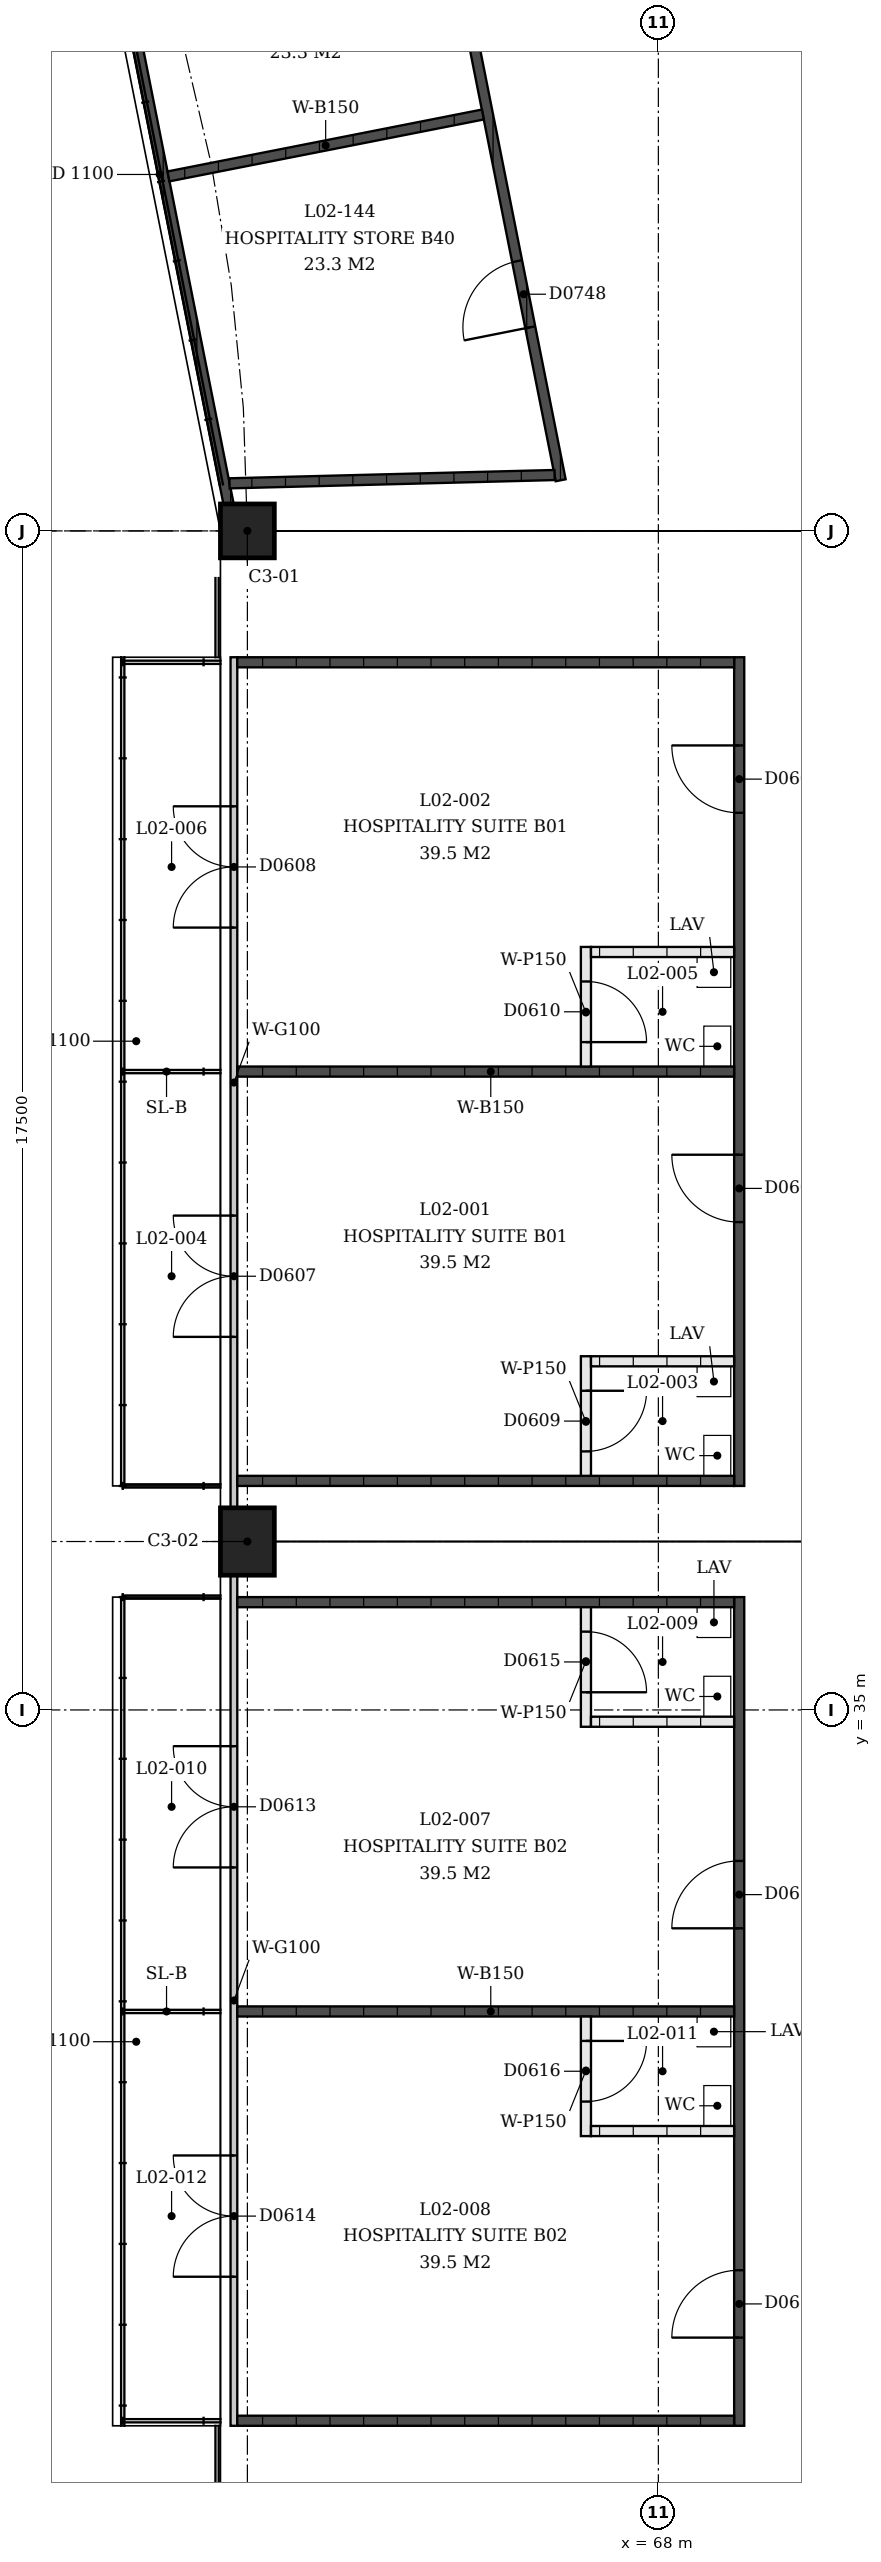
"""IFC4 building model, lengths in metres.
Left out: names, types, materials, properties, quantities, classifications, styles, units other than length and angle.
Written with IfcOpenShell. Run it as: python <this file> out.ifc"""

import sys

from ifc_helpers import new_model, si_unit, direction, frame, frame_2d, origin, origin_2d, place, context, subcontext, project, spatial, rectangle, extrude, element, fill, save


model = new_model("IFC4")
c1 = context("Model", 3, precision=1e-05, world=origin(), true_north=direction((0.0, 1.0)))
c2 = subcontext(c1, "Body", "Model", "MODEL_VIEW")
j1 = project(units=[si_unit("LENGTHUNIT", "METRE"), si_unit("PLANEANGLEUNIT", "RADIAN")], contexts=[c1])
p1 = place(None, origin())
s1 = spatial("IfcSite", under=j1, at=p1, CompositionType="ELEMENT")
p2 = place(p1, origin())
s2 = spatial("IfcBuilding", under=s1, at=p2, CompositionType="ELEMENT")
p3 = place(p2, frame((0.0, 0.0, 9.0)))
s3 = spatial("IfcBuildingStorey", under=s2, at=p3, CompositionType="ELEMENT", Elevation=9.0)
p4 = place(p3, frame((61.9, 52.5, 0.0), z_axis=(0.0, 0.0, 1.0), x_axis=(0.0, 1.0, 0.0)))
e1 = element("IfcColumn", 1, at=p4, inside=s3, PredefinedType="COLUMN", context=c2, shape_type="SweptSolid", body=[
    extrude(rectangle(XDim=0.8, YDim=0.8, at=origin_2d()), origin(), (0.0, 0.0, 1.0), 4.5),
])
p5 = place(p3, frame((61.9, 37.5, 0.0), z_axis=(0.0, 0.0, 1.0), x_axis=(0.0, 1.0, 0.0)))
e2 = element("IfcColumn", 2, at=p5, inside=s3, PredefinedType="COLUMN", context=c2, shape_type="SweptSolid", body=[
    extrude(rectangle(XDim=1.0, YDim=0.8, at=origin_2d()), origin(), (0.0, 0.0, 1.0), 4.5),
])
p6 = place(p3, frame((61.7, 38.0, 0.0), z_axis=(0.0, 0.0, 1.0), x_axis=(0.0, 1.0, 0.0)))
e3 = element("IfcWall", 3, at=p6, inside=s3, PredefinedType="PARTITIONING", context=c2, shape_type="SweptSolid", body=[
    extrude(rectangle(XDim=12.625, YDim=0.1, at=frame_2d((6.312, 0.0))), origin(), (0.0, 0.0, 1.0), 3.0),
])
p7 = place(p6, frame((2.538, 0.0, 0.0)))
e4 = element("IfcOpeningElement", 4, at=p7, cuts=e3, PredefinedType="OPENING", context=c2, shape_type="SweptSolid", body=[
    extrude(rectangle(XDim=1.8, YDim=2.1, at=frame_2d((0.9, 1.05))), frame((0.0, 0.05, 0.0), z_axis=(0.0, -1.0, 0.0), x_axis=(1.0, 0.0, 0.0)), (0.0, 0.0, 1.0), 0.1),
])
p8 = place(p6, frame((8.613, 0.0, 0.0)))
e5 = element("IfcOpeningElement", 5, at=p8, cuts=e3, PredefinedType="OPENING", context=c2, shape_type="SweptSolid", body=[
    extrude(rectangle(XDim=1.8, YDim=2.1, at=frame_2d((0.9, 1.05))), frame((0.0, 0.05, 0.0), z_axis=(0.0, -1.0, 0.0), x_axis=(1.0, 0.0, 0.0)), (0.0, 0.0, 1.0), 0.1),
])
p9 = place(p3, frame((69.2, 38.325, 0.0), z_axis=(0.0, 0.0, 1.0), x_axis=(0.0, 1.0, 0.0)))
e6 = element("IfcWall", 6, at=p9, inside=s3, PredefinedType="SOLIDWALL", context=c2, shape_type="SweptSolid", body=[
    extrude(rectangle(XDim=12.3, YDim=0.15, at=frame_2d((6.15, 0.0))), origin(), (0.0, 0.0, 1.0), 3.0),
])
p10 = place(p9, frame((3.916, 0.0, 0.0)))
e7 = element("IfcOpeningElement", 7, at=p10, cuts=e6, PredefinedType="OPENING", context=c2, shape_type="SweptSolid", body=[
    extrude(rectangle(XDim=1.0, YDim=2.1, at=frame_2d((0.5, 1.05))), frame((0.0, 0.075, 0.0), z_axis=(0.0, -1.0, 0.0), x_axis=(1.0, 0.0, 0.0)), (0.0, 0.0, 1.0), 0.15),
])
p11 = place(p9, frame((9.991, 0.0, 0.0)))
e8 = element("IfcOpeningElement", 8, at=p11, cuts=e6, PredefinedType="OPENING", context=c2, shape_type="SweptSolid", body=[
    extrude(rectangle(XDim=1.0, YDim=2.1, at=frame_2d((0.5, 1.05))), frame((0.0, 0.075, 0.0), z_axis=(0.0, -1.0, 0.0), x_axis=(1.0, 0.0, 0.0)), (0.0, 0.0, 1.0), 0.15),
])
for number, where, z_axis, x_axis in (
    (9, (61.75, 38.4, 0.0), (0.0, 0.0, 1.0), (1.0, 0.0, 0.0)),
    (10, (61.75, 44.475, 0.0), (0.0, 0.0, 1.0), (1.0, 0.0, 0.0)),
    (11, (61.75, 50.55, 0.0), (0.0, 0.0, 1.0), (1.0, 0.0, 0.0)),
):
    element("IfcWall", number, at=place(p3, frame(where, z_axis=z_axis, x_axis=x_axis)), inside=s3, PredefinedType="SOLIDWALL", context=c2, shape_type="SweptSolid", body=[
        extrude(rectangle(XDim=7.375, YDim=0.15, at=frame_2d((3.688, 0.0))), origin(), (0.0, 0.0, 1.0), 3.0),
    ])
p12 = place(p3, frame((66.925, 38.475, 0.0), z_axis=(0.0, 0.0, 1.0), x_axis=(0.0, 1.0, 0.0)))
e12 = element("IfcWall", 12, at=p12, inside=s3, PredefinedType="PARTITIONING", context=c2, shape_type="SweptSolid", body=[
    extrude(rectangle(XDim=1.775, YDim=0.15, at=frame_2d((0.887, 0.0))), origin(), (0.0, 0.0, 1.0), 3.0),
])
p13 = place(p12, frame((0.363, 0.0, 0.0)))
e13 = element("IfcOpeningElement", 13, at=p13, cuts=e12, PredefinedType="OPENING", context=c2, shape_type="SweptSolid", body=[
    extrude(rectangle(XDim=0.9, YDim=2.1, at=frame_2d((0.45, 1.05))), frame((0.0, 0.075, 0.0), z_axis=(0.0, -1.0, 0.0), x_axis=(1.0, 0.0, 0.0)), (0.0, 0.0, 1.0), 0.15),
])
p14 = place(p3, frame((67.0, 40.175, 0.0), z_axis=(0.0, 0.0, 1.0), x_axis=(1.0, 0.0, 0.0)))
e14 = element("IfcWall", 14, at=p14, inside=s3, PredefinedType="PARTITIONING", context=c2, shape_type="SweptSolid", body=[
    extrude(rectangle(XDim=2.125, YDim=0.15, at=frame_2d((1.062, 0.0))), origin(), (0.0, 0.0, 1.0), 3.0),
])
p15 = place(p3, frame((66.925, 44.55, 0.0), z_axis=(0.0, 0.0, 1.0), x_axis=(0.0, 1.0, 0.0)))
e15 = element("IfcWall", 15, at=p15, inside=s3, PredefinedType="PARTITIONING", context=c2, shape_type="SweptSolid", body=[
    extrude(rectangle(XDim=1.775, YDim=0.15, at=frame_2d((0.887, 0.0))), origin(), (0.0, 0.0, 1.0), 3.0),
])
p16 = place(p15, frame((0.363, 0.0, 0.0)))
e16 = element("IfcOpeningElement", 16, at=p16, cuts=e15, PredefinedType="OPENING", context=c2, shape_type="SweptSolid", body=[
    extrude(rectangle(XDim=0.9, YDim=2.1, at=frame_2d((0.45, 1.05))), frame((0.0, 0.075, 0.0), z_axis=(0.0, -1.0, 0.0), x_axis=(1.0, 0.0, 0.0)), (0.0, 0.0, 1.0), 0.15),
])
p17 = place(p3, frame((67.0, 46.25, 0.0), z_axis=(0.0, 0.0, 1.0), x_axis=(1.0, 0.0, 0.0)))
e17 = element("IfcWall", 17, at=p17, inside=s3, PredefinedType="PARTITIONING", context=c2, shape_type="SweptSolid", body=[
    extrude(rectangle(XDim=2.125, YDim=0.15, at=frame_2d((1.062, 0.0))), origin(), (0.0, 0.0, 1.0), 3.0),
])
p18 = place(p3, frame((61.7, 37.0, 0.0), z_axis=(0.0, 0.0, 1.0), x_axis=(0.0, -1.0, 0.0)))
e18 = element("IfcWall", 18, at=p18, inside=s3, PredefinedType="PARTITIONING", context=c2, shape_type="SweptSolid", body=[
    extrude(rectangle(XDim=12.625, YDim=0.1, at=frame_2d((6.312, 0.0))), origin(), (0.0, 0.0, 1.0), 3.0),
])
p19 = place(p18, frame((2.538, 0.0, 0.0)))
e19 = element("IfcOpeningElement", 19, at=p19, cuts=e18, PredefinedType="OPENING", context=c2, shape_type="SweptSolid", body=[
    extrude(rectangle(XDim=1.8, YDim=2.1, at=frame_2d((0.9, 1.05))), frame((0.0, 0.05, 0.0), z_axis=(0.0, -1.0, 0.0), x_axis=(1.0, 0.0, 0.0)), (0.0, 0.0, 1.0), 0.1),
])
p20 = place(p18, frame((8.613, 0.0, 0.0)))
e20 = element("IfcOpeningElement", 20, at=p20, cuts=e18, PredefinedType="OPENING", context=c2, shape_type="SweptSolid", body=[
    extrude(rectangle(XDim=1.8, YDim=2.1, at=frame_2d((0.9, 1.05))), frame((0.0, 0.05, 0.0), z_axis=(0.0, -1.0, 0.0), x_axis=(1.0, 0.0, 0.0)), (0.0, 0.0, 1.0), 0.1),
])
p21 = place(p3, frame((69.2, 36.675, 0.0), z_axis=(0.0, 0.0, 1.0), x_axis=(0.0, -1.0, 0.0)))
e21 = element("IfcWall", 21, at=p21, inside=s3, PredefinedType="SOLIDWALL", context=c2, shape_type="SweptSolid", body=[
    extrude(rectangle(XDim=12.3, YDim=0.15, at=frame_2d((6.15, 0.0))), origin(), (0.0, 0.0, 1.0), 3.0),
])
p22 = place(p21, frame((3.916, 0.0, 0.0)))
e22 = element("IfcOpeningElement", 22, at=p22, cuts=e21, PredefinedType="OPENING", context=c2, shape_type="SweptSolid", body=[
    extrude(rectangle(XDim=1.0, YDim=2.1, at=frame_2d((0.5, 1.05))), frame((0.0, 0.075, 0.0), z_axis=(0.0, -1.0, 0.0), x_axis=(1.0, 0.0, 0.0)), (0.0, 0.0, 1.0), 0.15),
])
p23 = place(p21, frame((9.991, 0.0, 0.0)))
e23 = element("IfcOpeningElement", 23, at=p23, cuts=e21, PredefinedType="OPENING", context=c2, shape_type="SweptSolid", body=[
    extrude(rectangle(XDim=1.0, YDim=2.1, at=frame_2d((0.5, 1.05))), frame((0.0, 0.075, 0.0), z_axis=(0.0, -1.0, 0.0), x_axis=(1.0, 0.0, 0.0)), (0.0, 0.0, 1.0), 0.15),
])
for number, where, z_axis, x_axis in (
    (24, (61.75, 36.6, 0.0), (0.0, 0.0, 1.0), (1.0, 0.0, 0.0)),
    (25, (61.75, 30.525, 0.0), (0.0, 0.0, 1.0), (1.0, 0.0, 0.0)),
    (26, (61.75, 24.45, 0.0), (0.0, 0.0, 1.0), (1.0, 0.0, 0.0)),
):
    element("IfcWall", number, at=place(p3, frame(where, z_axis=z_axis, x_axis=x_axis)), inside=s3, PredefinedType="SOLIDWALL", context=c2, shape_type="SweptSolid", body=[
        extrude(rectangle(XDim=7.375, YDim=0.15, at=frame_2d((3.688, 0.0))), origin(), (0.0, 0.0, 1.0), 3.0),
    ])
p24 = place(p3, frame((66.925, 36.525, 0.0), z_axis=(0.0, 0.0, 1.0), x_axis=(0.0, -1.0, 0.0)))
e27 = element("IfcWall", 27, at=p24, inside=s3, PredefinedType="PARTITIONING", context=c2, shape_type="SweptSolid", body=[
    extrude(rectangle(XDim=1.775, YDim=0.15, at=frame_2d((0.887, 0.0))), origin(), (0.0, 0.0, 1.0), 3.0),
])
p25 = place(p24, frame((0.363, 0.0, 0.0)))
e28 = element("IfcOpeningElement", 28, at=p25, cuts=e27, PredefinedType="OPENING", context=c2, shape_type="SweptSolid", body=[
    extrude(rectangle(XDim=0.9, YDim=2.1, at=frame_2d((0.45, 1.05))), frame((0.0, 0.075, 0.0), z_axis=(0.0, -1.0, 0.0), x_axis=(1.0, 0.0, 0.0)), (0.0, 0.0, 1.0), 0.15),
])
p26 = place(p3, frame((67.0, 34.825, 0.0), z_axis=(0.0, 0.0, 1.0), x_axis=(1.0, 0.0, 0.0)))
e29 = element("IfcWall", 29, at=p26, inside=s3, PredefinedType="PARTITIONING", context=c2, shape_type="SweptSolid", body=[
    extrude(rectangle(XDim=2.125, YDim=0.15, at=frame_2d((1.062, 0.0))), origin(), (0.0, 0.0, 1.0), 3.0),
])
p27 = place(p3, frame((66.925, 30.45, 0.0), z_axis=(0.0, 0.0, 1.0), x_axis=(0.0, -1.0, 0.0)))
e30 = element("IfcWall", 30, at=p27, inside=s3, PredefinedType="PARTITIONING", context=c2, shape_type="SweptSolid", body=[
    extrude(rectangle(XDim=1.775, YDim=0.15, at=frame_2d((0.887, 0.0))), origin(), (0.0, 0.0, 1.0), 3.0),
])
p28 = place(p27, frame((0.363, 0.0, 0.0)))
e31 = element("IfcOpeningElement", 31, at=p28, cuts=e30, PredefinedType="OPENING", context=c2, shape_type="SweptSolid", body=[
    extrude(rectangle(XDim=0.9, YDim=2.1, at=frame_2d((0.45, 1.05))), frame((0.0, 0.075, 0.0), z_axis=(0.0, -1.0, 0.0), x_axis=(1.0, 0.0, 0.0)), (0.0, 0.0, 1.0), 0.15),
])
p29 = place(p3, frame((67.0, 28.75, 0.0), z_axis=(0.0, 0.0, 1.0), x_axis=(1.0, 0.0, 0.0)))
e32 = element("IfcWall", 32, at=p29, inside=s3, PredefinedType="PARTITIONING", context=c2, shape_type="SweptSolid", body=[
    extrude(rectangle(XDim=2.125, YDim=0.15, at=frame_2d((1.062, 0.0))), origin(), (0.0, 0.0, 1.0), 3.0),
])
p30 = place(p3, frame((59.681, 62.65, 0.0), z_axis=(0.0, 0.0, 1.0), x_axis=(0.195086492048, -0.980786042223, 0.0)))
e33 = element("IfcWall", 33, at=p30, inside=s3, PredefinedType="SOLIDWALL", context=c2, shape_type="SweptSolid", body=[
    extrude(rectangle(XDim=9.941, YDim=0.15, at=frame_2d((4.971, 0.0))), origin(), (0.0, 0.0, 1.0), 3.0),
])
p31 = place(p3, frame((64.385, 64.138, 0.0), z_axis=(0.0, 0.0, 1.0), x_axis=(0.195083899224, -0.980786557954, 0.0)))
e34 = element("IfcWall", 34, at=p31, inside=s3, PredefinedType="SOLIDWALL", context=c2, shape_type="SweptSolid", body=[
    extrude(rectangle(XDim=11.099, YDim=0.15, at=frame_2d((5.55, 0.0))), origin(), (0.0, 0.0, 1.0), 3.0),
])
p32 = place(p31, frame((2.315, 0.0, 0.0)))
e35 = element("IfcOpeningElement", 35, at=p32, cuts=e34, PredefinedType="OPENING", context=c2, shape_type="SweptSolid", body=[
    extrude(rectangle(XDim=1.0, YDim=2.1, at=frame_2d((0.5, 1.05))), frame((0.0, 0.075, 0.0), z_axis=(0.0, -1.0, 0.0), x_axis=(1.0, 0.0, 0.0)), (0.0, 0.0, 1.0), 0.15),
])
p33 = place(p31, frame((7.784, 0.0, 0.0)))
e36 = element("IfcOpeningElement", 36, at=p33, cuts=e34, PredefinedType="OPENING", context=c2, shape_type="SweptSolid", body=[
    extrude(rectangle(XDim=1.0, YDim=2.1, at=frame_2d((0.5, 1.05))), frame((0.0, 0.075, 0.0), z_axis=(0.0, -1.0, 0.0), x_axis=(1.0, 0.0, 0.0)), (0.0, 0.0, 1.0), 0.15),
])
p34 = place(p3, frame((60.728, 57.762, 0.0), z_axis=(0.0, 0.0, 1.0), x_axis=(0.981172300115, 0.19313445443, 0.0)))
e37 = element("IfcWall", 37, at=p34, inside=s3, PredefinedType="SOLIDWALL", context=c2, shape_type="SweptSolid", body=[
    extrude(rectangle(XDim=4.757, YDim=0.15, at=frame_2d((2.378, 0.0))), origin(), (0.0, 0.0, 1.0), 3.0),
])
p35 = place(p3, frame((61.635, 53.206, 0.0), z_axis=(0.0, 0.0, 1.0), x_axis=(0.999673752981, 0.025541879345, 0.0)))
e38 = element("IfcWall", 38, at=p35, inside=s3, PredefinedType="SOLIDWALL", context=c2, shape_type="SweptSolid", body=[
    extrude(rectangle(XDim=4.827, YDim=0.15, at=frame_2d((2.414, 0.0))), origin(), (0.0, 0.0, 1.0), 3.0),
])
p36 = place(p10, origin())
e39 = element("IfcDoor", 39, at=p36, inside=s3, OperationType="SINGLE_SWING_LEFT", PredefinedType="DOOR", context=c2, shape_type="SweptSolid", body=[
    extrude(rectangle(XDim=1.0, YDim=2.1, at=frame_2d((0.5, 1.05))), frame((0.0, 0.025, 0.0), z_axis=(0.0, -1.0, 0.0), x_axis=(1.0, 0.0, 0.0)), (0.0, 0.0, 1.0), 0.05),
])
fill(e7, e39)
p37 = place(p11, origin())
e40 = element("IfcDoor", 40, at=p37, inside=s3, OperationType="SINGLE_SWING_LEFT", PredefinedType="DOOR", context=c2, shape_type="SweptSolid", body=[
    extrude(rectangle(XDim=1.0, YDim=2.1, at=frame_2d((0.5, 1.05))), frame((0.0, 0.025, 0.0), z_axis=(0.0, -1.0, 0.0), x_axis=(1.0, 0.0, 0.0)), (0.0, 0.0, 1.0), 0.05),
])
fill(e8, e40)
p38 = place(p7, origin())
e41 = element("IfcDoor", 41, at=p38, inside=s3, OperationType="DOUBLE_DOOR_SINGLE_SWING", PredefinedType="DOOR", context=c2, shape_type="SweptSolid", body=[
    extrude(rectangle(XDim=1.8, YDim=2.1, at=frame_2d((0.9, 1.05))), frame((0.0, 0.025, 0.0), z_axis=(0.0, -1.0, 0.0), x_axis=(1.0, 0.0, 0.0)), (0.0, 0.0, 1.0), 0.05),
])
fill(e4, e41)
p39 = place(p8, origin())
e42 = element("IfcDoor", 42, at=p39, inside=s3, OperationType="DOUBLE_DOOR_SINGLE_SWING", PredefinedType="DOOR", context=c2, shape_type="SweptSolid", body=[
    extrude(rectangle(XDim=1.8, YDim=2.1, at=frame_2d((0.9, 1.05))), frame((0.0, 0.025, 0.0), z_axis=(0.0, -1.0, 0.0), x_axis=(1.0, 0.0, 0.0)), (0.0, 0.0, 1.0), 0.05),
])
fill(e5, e42)
p40 = place(p13, origin())
e43 = element("IfcDoor", 43, at=p40, inside=s3, OperationType="SINGLE_SWING_RIGHT", PredefinedType="DOOR", context=c2, shape_type="SweptSolid", body=[
    extrude(rectangle(XDim=0.9, YDim=2.1, at=frame_2d((0.45, 1.05))), frame((0.0, 0.025, 0.0), z_axis=(0.0, -1.0, 0.0), x_axis=(1.0, 0.0, 0.0)), (0.0, 0.0, 1.0), 0.05),
])
fill(e13, e43)
p41 = place(p16, origin())
e44 = element("IfcDoor", 44, at=p41, inside=s3, OperationType="SINGLE_SWING_LEFT", PredefinedType="DOOR", context=c2, shape_type="SweptSolid", body=[
    extrude(rectangle(XDim=0.9, YDim=2.1, at=frame_2d((0.45, 1.05))), frame((0.0, 0.025, 0.0), z_axis=(0.0, -1.0, 0.0), x_axis=(1.0, 0.0, 0.0)), (0.0, 0.0, 1.0), 0.05),
])
fill(e16, e44)
p42 = place(p22, origin())
e45 = element("IfcDoor", 45, at=p42, inside=s3, OperationType="SINGLE_SWING_RIGHT", PredefinedType="DOOR", context=c2, shape_type="SweptSolid", body=[
    extrude(rectangle(XDim=1.0, YDim=2.1, at=frame_2d((0.5, 1.05))), frame((0.0, 0.025, 0.0), z_axis=(0.0, -1.0, 0.0), x_axis=(1.0, 0.0, 0.0)), (0.0, 0.0, 1.0), 0.05),
])
fill(e22, e45)
p43 = place(p23, origin())
e46 = element("IfcDoor", 46, at=p43, inside=s3, OperationType="SINGLE_SWING_RIGHT", PredefinedType="DOOR", context=c2, shape_type="SweptSolid", body=[
    extrude(rectangle(XDim=1.0, YDim=2.1, at=frame_2d((0.5, 1.05))), frame((0.0, 0.025, 0.0), z_axis=(0.0, -1.0, 0.0), x_axis=(1.0, 0.0, 0.0)), (0.0, 0.0, 1.0), 0.05),
])
fill(e23, e46)
p44 = place(p19, origin())
e47 = element("IfcDoor", 47, at=p44, inside=s3, OperationType="DOUBLE_DOOR_SINGLE_SWING", PredefinedType="DOOR", context=c2, shape_type="SweptSolid", body=[
    extrude(rectangle(XDim=1.8, YDim=2.1, at=frame_2d((0.9, 1.05))), frame((0.0, 0.025, 0.0), z_axis=(0.0, -1.0, 0.0), x_axis=(1.0, 0.0, 0.0)), (0.0, 0.0, 1.0), 0.05),
])
fill(e19, e47)
p45 = place(p20, origin())
e48 = element("IfcDoor", 48, at=p45, inside=s3, OperationType="DOUBLE_DOOR_SINGLE_SWING", PredefinedType="DOOR", context=c2, shape_type="SweptSolid", body=[
    extrude(rectangle(XDim=1.8, YDim=2.1, at=frame_2d((0.9, 1.05))), frame((0.0, 0.025, 0.0), z_axis=(0.0, -1.0, 0.0), x_axis=(1.0, 0.0, 0.0)), (0.0, 0.0, 1.0), 0.05),
])
fill(e20, e48)
p46 = place(p25, origin())
e49 = element("IfcDoor", 49, at=p46, inside=s3, OperationType="SINGLE_SWING_LEFT", PredefinedType="DOOR", context=c2, shape_type="SweptSolid", body=[
    extrude(rectangle(XDim=0.9, YDim=2.1, at=frame_2d((0.45, 1.05))), frame((0.0, 0.025, 0.0), z_axis=(0.0, -1.0, 0.0), x_axis=(1.0, 0.0, 0.0)), (0.0, 0.0, 1.0), 0.05),
])
fill(e28, e49)
p47 = place(p28, origin())
e50 = element("IfcDoor", 50, at=p47, inside=s3, OperationType="SINGLE_SWING_RIGHT", PredefinedType="DOOR", context=c2, shape_type="SweptSolid", body=[
    extrude(rectangle(XDim=0.9, YDim=2.1, at=frame_2d((0.45, 1.05))), frame((0.0, 0.025, 0.0), z_axis=(0.0, -1.0, 0.0), x_axis=(1.0, 0.0, 0.0)), (0.0, 0.0, 1.0), 0.05),
])
fill(e31, e50)
p48 = place(p33, origin())
e51 = element("IfcDoor", 51, at=p48, inside=s3, OperationType="SINGLE_SWING_RIGHT", PredefinedType="DOOR", context=c2, shape_type="SweptSolid", body=[
    extrude(rectangle(XDim=1.0, YDim=2.1, at=frame_2d((0.5, 1.05))), frame((0.0, 0.025, 0.0), z_axis=(0.0, -1.0, 0.0), x_axis=(1.0, 0.0, 0.0)), (0.0, 0.0, 1.0), 0.05),
])
fill(e36, e51)
save(model, sys.argv[1])
